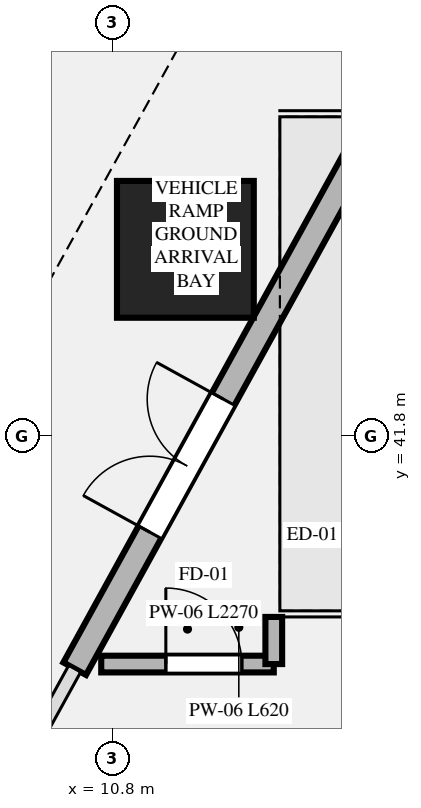
"""IFC4 building model, lengths in metres.
Left out: names, types, materials, properties, quantities, classifications, styles, units other than length and angle.
Written with IfcOpenShell. Run it as: python <this file> out.ifc"""

import sys

from ifc_helpers import new_model, si_unit, direction, frame, frame_2d, origin, origin_2d, place, context, subcontext, project, spatial, rectangle, extrude, element, fill, save


model = new_model("IFC4")
c1 = context("Model", 3, precision=1e-05, world=origin(), true_north=direction((0.0, 1.0)))
c2 = subcontext(c1, "Body", "Model", "MODEL_VIEW")
j1 = project(units=[si_unit("LENGTHUNIT", "METRE"), si_unit("PLANEANGLEUNIT", "RADIAN")], contexts=[c1])
p1 = place(None, origin())
s1 = spatial("IfcSite", under=j1, at=p1, CompositionType="ELEMENT")
p2 = place(p1, origin())
s2 = spatial("IfcBuilding", under=s1, at=p2, CompositionType="ELEMENT")
p3 = place(p2, origin())
s3 = spatial("IfcBuildingStorey", under=s2, at=p3, CompositionType="ELEMENT", Elevation=0.0)
p4 = place(p3, frame((11.757, 44.256, 0.0), z_axis=(0.0, 0.0, 1.0), x_axis=(1.0, 0.0, 0.0)))
e1 = element("IfcColumn", 1, at=p4, inside=s3, PredefinedType="COLUMN", context=c2, shape_type="SweptSolid", body=[
    extrude(rectangle(XDim=1.8, YDim=1.8, at=origin_2d()), origin(), (0.0, 0.0, 1.0), 6.0),
])
p5 = place(p3, frame((10.65, 38.8, 0.0), z_axis=(0.0, 0.0, 1.0), x_axis=(1.0, 0.0, 0.0)))
e2 = element("IfcWall", 2, at=p5, inside=s3, PredefinedType="PARTITIONING", context=c2, shape_type="SweptSolid", body=[
    extrude(rectangle(XDim=2.27, YDim=0.22, at=frame_2d((1.135, 0.0))), origin(), (0.0, 0.0, 1.0), 5.75),
])
p6 = place(p5, frame((0.85, 0.0, 0.0)))
e3 = element("IfcOpeningElement", 3, at=p6, cuts=e2, PredefinedType="OPENING", context=c2, shape_type="SweptSolid", body=[
    extrude(rectangle(XDim=1.0, YDim=2.15, at=frame_2d((0.5, 1.075))), frame((0.0, 0.12, 0.0), z_axis=(0.0, -1.0, 0.0), x_axis=(1.0, 0.0, 0.0)), (0.0, 0.0, 1.0), 0.24),
])
p7 = place(p3, frame((12.92, 38.8, 0.0), z_axis=(0.0, 0.0, 1.0), x_axis=(0.0, 1.0, 0.0)))
e4 = element("IfcWall", 4, at=p7, inside=s3, PredefinedType="PARTITIONING", context=c2, shape_type="SweptSolid", body=[
    extrude(rectangle(XDim=0.62, YDim=0.22, at=frame_2d((0.31, 0.0))), origin(), (0.0, 0.0, 1.0), 5.75),
])
p8 = place(p3, frame((10.301, 38.739, 0.0), z_axis=(0.0, 0.0, 1.0), x_axis=(0.48235622808, 0.875975153319, 0.0)))
e5 = element("IfcWall", 5, at=p8, inside=s3, PredefinedType="STANDARD", context=c2, shape_type="SweptSolid", body=[
    extrude(rectangle(XDim=10.581, YDim=0.34, at=frame_2d((5.291, 0.0))), origin(), (0.0, 0.0, 1.0), 5.75),
])
p9 = place(p8, frame((2.05, 0.0, 0.0)))
e6 = element("IfcOpeningElement", 6, at=p9, cuts=e5, PredefinedType="OPENING", context=c2, shape_type="SweptSolid", body=[
    extrude(rectangle(XDim=2.0, YDim=2.4, at=frame_2d((1.0, 1.2))), frame((0.0, 0.18, 0.0), z_axis=(0.0, -1.0, 0.0), x_axis=(1.0, 0.0, 0.0)), (0.0, 0.0, 1.0), 0.36),
])
p10 = place(p6, origin())
e7 = element("IfcDoor", 7, at=p10, inside=s3, OperationType="SINGLE_SWING_LEFT", PredefinedType="DOOR", context=c2, shape_type="SweptSolid", body=[
    extrude(rectangle(XDim=1.0, YDim=2.15, at=frame_2d((0.5, 1.075))), frame((0.0, 0.025, 0.0), z_axis=(0.0, -1.0, 0.0), x_axis=(1.0, 0.0, 0.0)), (0.0, 0.0, 1.0), 0.05),
])
fill(e3, e7)
p11 = place(p9, origin())
e8 = element("IfcDoor", 8, at=p11, inside=s3, OperationType="DOUBLE_DOOR_SINGLE_SWING", PredefinedType="DOOR", context=c2, shape_type="SweptSolid", body=[
    extrude(rectangle(XDim=2.0, YDim=2.4, at=frame_2d((1.0, 1.2))), frame((0.0, 0.025, 0.0), z_axis=(0.0, -1.0, 0.0), x_axis=(1.0, 0.0, 0.0)), (0.0, 0.0, 1.0), 0.05),
])
fill(e6, e8)
save(model, sys.argv[1])
